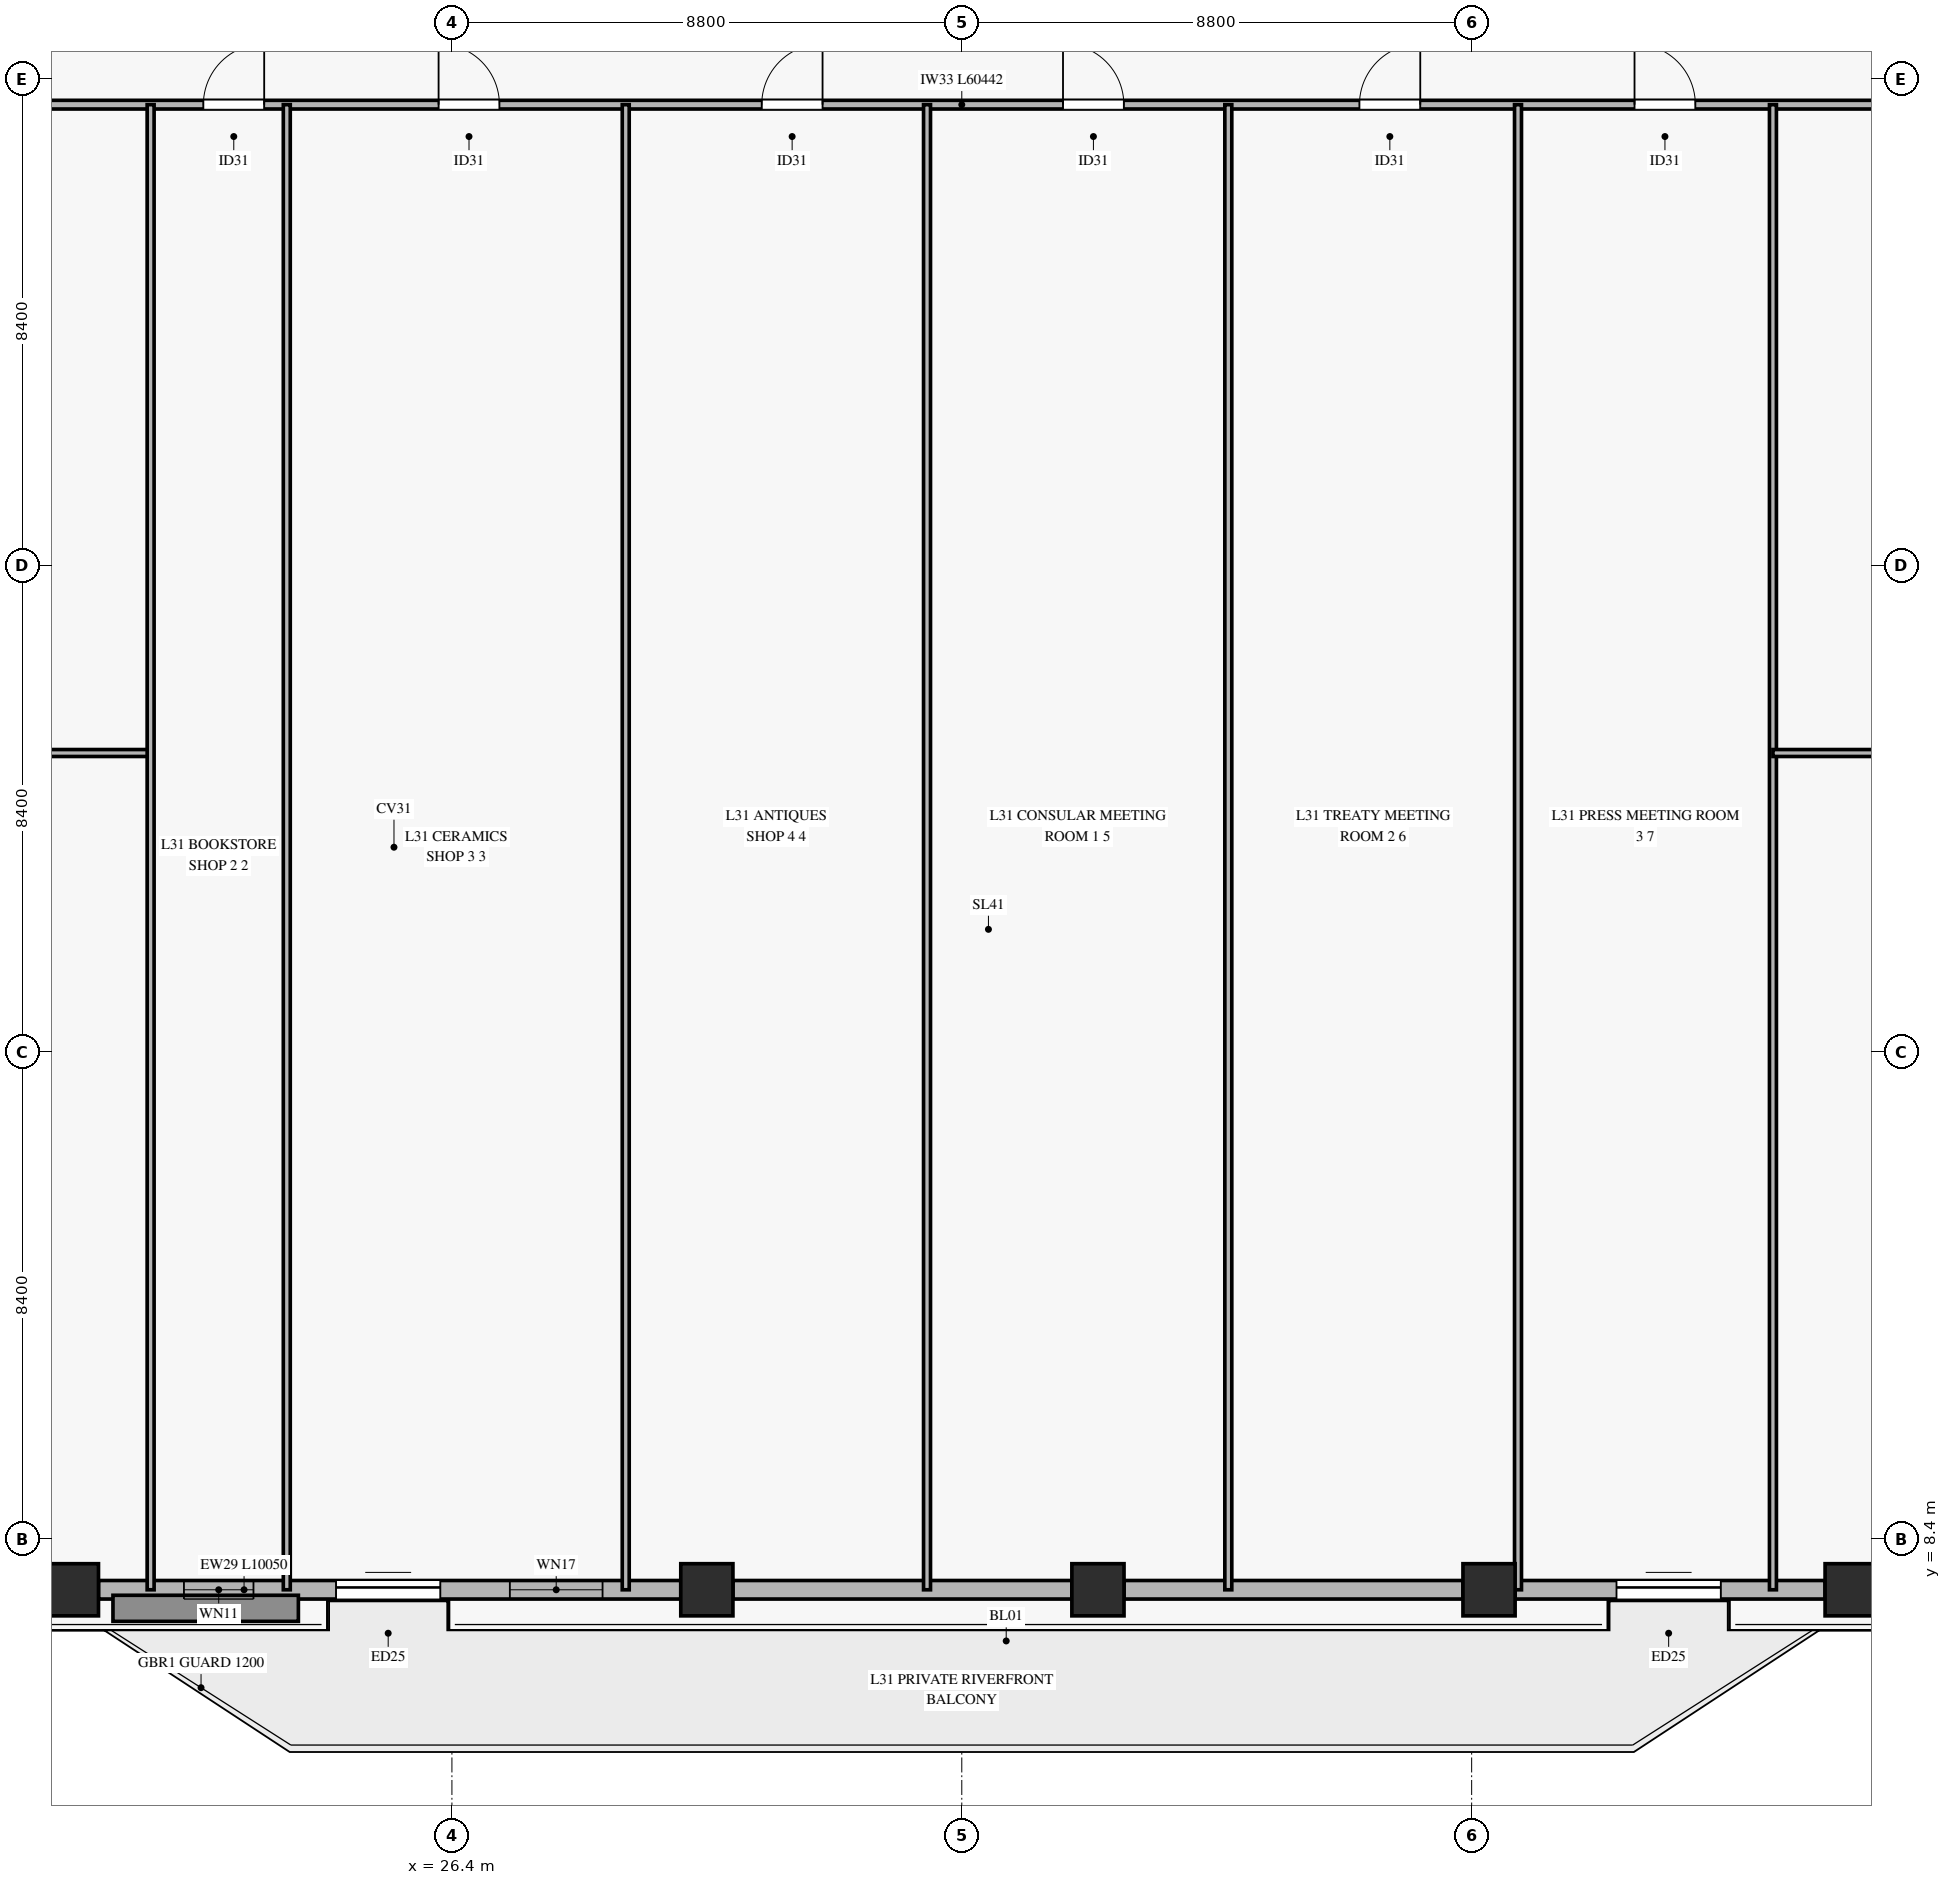
"""IFC4 building model, lengths in metres.
Left out: names, types, materials, properties, quantities, classifications, styles, units other than length and angle.
Written with IfcOpenShell. Run it as: python <this file> out.ifc"""

import sys

from ifc_helpers import new_model, si_unit, direction, frame, frame_2d, origin, origin_2d, place, context, subcontext, project, spatial, rectangle, hollow_rectangle, extrude, source, transform, mapped, element, fill, save


model = new_model("IFC4")
c1 = context("Model", 3, precision=1e-05, world=origin(), true_north=direction((0.0, 1.0)))
c2 = subcontext(c1, "Body", "Model", "MODEL_VIEW")
j1 = project(units=[si_unit("LENGTHUNIT", "METRE"), si_unit("PLANEANGLEUNIT", "RADIAN")], contexts=[c1])
p1 = place(None, origin())
s1 = spatial("IfcSite", under=j1, at=p1, CompositionType="ELEMENT")
p2 = place(p1, origin())
s2 = spatial("IfcBuilding", under=s1, at=p2, CompositionType="ELEMENT")
p3 = place(p2, frame((0.0, 0.0, 127.0)))
s3 = spatial("IfcBuildingStorey", under=s2, at=p3, CompositionType="ELEMENT", Elevation=127.0)
m1 = source(origin(), c2, "Body", "SweptSolid", [
    extrude(hollow_rectangle(XDim=0.9, YDim=0.9, WallThickness=0.04, at=origin_2d()), origin(), (0.0, 0.0, 1.0), 3.64),
])
for number, where, z_axis, x_axis in (
    (1, (19.85, 7.518, 0.0), (0.0, 0.0, 1.0), (1.0, 0.0, 0.0)),
    (2, (30.8, 7.518, 0.0), (0.0, 0.0, 1.0), (1.0, 0.0, 0.0)),
    (3, (37.55, 7.518, 0.0), (0.0, 0.0, 1.0), (1.0, 0.0, 0.0)),
    (4, (44.3, 7.518, 0.0), (0.0, 0.0, 1.0), (1.0, 0.0, 0.0)),
    (5, (50.55, 7.518, 0.0), (0.0, 0.0, 1.0), (1.0, 0.0, 0.0)),
):
    element("IfcColumn", number, at=place(p3, frame(where, z_axis=z_axis, x_axis=x_axis)), inside=s3, PredefinedType="COLUMN", context=c2, shape_type="MappedRepresentation", body=[
        mapped(m1, transform((0.0, 0.0, 0.0), x_axis=(1.0, 0.0, 0.0), y_axis=(0.0, 1.0, 0.0), z_axis=(0.0, 0.0, 1.0), scale=1.0)),
    ])
p4 = place(p3, frame((20.3, 7.518, 0.0), z_axis=(0.0, 0.0, 1.0), x_axis=(1.0, 0.0, 0.0)))
e6 = element("IfcWall", 6, at=p4, inside=s3, PredefinedType="SOLIDWALL", context=c2, shape_type="SweptSolid", body=[
    extrude(rectangle(XDim=10.05, YDim=0.32, at=frame_2d((5.025, 0.0))), origin(), (0.0, 0.0, 1.0), 3.12),
])
p5 = place(p4, frame((4.1, 0.0, 0.0)))
e7 = element("IfcOpeningElement", 7, at=p5, cuts=e6, PredefinedType="OPENING", context=c2, shape_type="SweptSolid", body=[
    extrude(rectangle(XDim=1.8, YDim=2.25, at=frame_2d((0.9, 1.125))), frame((0.0, 0.17, 0.0), z_axis=(0.0, -1.0, 0.0), x_axis=(1.0, 0.0, 0.0)), (0.0, 0.0, 1.0), 0.34),
])
p6 = place(p4, frame((1.475, 0.0, 0.45)))
e8 = element("IfcOpeningElement", 8, at=p6, cuts=e6, PredefinedType="OPENING", context=c2, shape_type="SweptSolid", body=[
    extrude(rectangle(XDim=1.2, YDim=2.0, at=frame_2d((0.6, 1.0))), frame((0.0, 0.17, 0.0), z_axis=(0.0, -1.0, 0.0), x_axis=(1.0, 0.0, 0.0)), (0.0, 0.0, 1.0), 0.34),
])
p7 = place(p4, frame((7.1, 0.0, 0.45)))
e9 = element("IfcOpeningElement", 9, at=p7, cuts=e6, PredefinedType="OPENING", context=c2, shape_type="SweptSolid", body=[
    extrude(rectangle(XDim=1.6, YDim=2.0, at=frame_2d((0.8, 1.0))), frame((0.0, 0.17, 0.0), z_axis=(0.0, -1.0, 0.0), x_axis=(1.0, 0.0, 0.0)), (0.0, 0.0, 1.0), 0.34),
])
for number, where, z_axis, x_axis in (
    (10, (31.25, 7.518, 0.0), (0.0, 0.0, 1.0), (1.0, 0.0, 0.0)),
    (11, (38.0, 7.518, 0.0), (0.0, 0.0, 1.0), (1.0, 0.0, 0.0)),
):
    element("IfcWall", number, at=place(p3, frame(where, z_axis=z_axis, x_axis=x_axis)), inside=s3, PredefinedType="SOLIDWALL", context=c2, shape_type="SweptSolid", body=[
        extrude(rectangle(XDim=5.85, YDim=0.32, at=frame_2d((2.925, 0.0))), origin(), (0.0, 0.0, 1.0), 3.12),
    ])
p8 = place(p3, frame((44.75, 7.518, 0.0), z_axis=(0.0, 0.0, 1.0), x_axis=(1.0, 0.0, 0.0)))
e12 = element("IfcWall", 12, at=p8, inside=s3, PredefinedType="SOLIDWALL", context=c2, shape_type="SweptSolid", body=[
    extrude(rectangle(XDim=5.35, YDim=0.32, at=frame_2d((2.675, 0.0))), origin(), (0.0, 0.0, 1.0), 3.12),
])
p9 = place(p8, frame((1.75, 0.0, 0.0)))
e13 = element("IfcOpeningElement", 13, at=p9, cuts=e12, PredefinedType="OPENING", context=c2, shape_type="SweptSolid", body=[
    extrude(rectangle(XDim=1.8, YDim=2.25, at=frame_2d((0.9, 1.125))), frame((0.0, 0.17, 0.0), z_axis=(0.0, -1.0, 0.0), x_axis=(1.0, 0.0, 0.0)), (0.0, 0.0, 1.0), 0.34),
])
p10 = place(p3, frame((4.979, 33.15, 0.0), z_axis=(0.0, 0.0, 1.0), x_axis=(1.0, 0.0, 0.0)))
e14 = element("IfcWall", 14, at=p10, inside=s3, PredefinedType="PARTITIONING", context=c2, shape_type="SweptSolid", body=[
    extrude(rectangle(XDim=60.442, YDim=0.15, at=frame_2d((30.221, 0.0))), origin(), (0.0, 0.0, 1.0), 2.725),
])
p11 = place(p10, frame((6.774, 0.0, 0.0)))
e15 = element("IfcOpeningElement", 15, at=p11, cuts=e14, PredefinedType="OPENING", context=c2, shape_type="SweptSolid", body=[
    extrude(rectangle(XDim=1.05, YDim=2.15, at=frame_2d((0.525, 1.075))), frame((0.0, 0.085, 0.0), z_axis=(0.0, -1.0, 0.0), x_axis=(1.0, 0.0, 0.0)), (0.0, 0.0, 1.0), 0.17),
])
p12 = place(p10, frame((17.131, 0.0, 0.0)))
e16 = element("IfcOpeningElement", 16, at=p12, cuts=e14, PredefinedType="OPENING", context=c2, shape_type="SweptSolid", body=[
    extrude(rectangle(XDim=1.05, YDim=2.15, at=frame_2d((0.525, 1.075))), frame((0.0, 0.085, 0.0), z_axis=(0.0, -1.0, 0.0), x_axis=(1.0, 0.0, 0.0)), (0.0, 0.0, 1.0), 0.17),
])
p13 = place(p10, frame((21.191, 0.0, 0.0)))
e17 = element("IfcOpeningElement", 17, at=p13, cuts=e14, PredefinedType="OPENING", context=c2, shape_type="SweptSolid", body=[
    extrude(rectangle(XDim=1.05, YDim=2.15, at=frame_2d((0.525, 1.075))), frame((0.0, 0.085, 0.0), z_axis=(0.0, -1.0, 0.0), x_axis=(1.0, 0.0, 0.0)), (0.0, 0.0, 1.0), 0.17),
])
p14 = place(p10, frame((26.768, 0.0, 0.0)))
e18 = element("IfcOpeningElement", 18, at=p14, cuts=e14, PredefinedType="OPENING", context=c2, shape_type="SweptSolid", body=[
    extrude(rectangle(XDim=1.05, YDim=2.15, at=frame_2d((0.525, 1.075))), frame((0.0, 0.085, 0.0), z_axis=(0.0, -1.0, 0.0), x_axis=(1.0, 0.0, 0.0)), (0.0, 0.0, 1.0), 0.17),
])
p15 = place(p10, frame((31.968, 0.0, 0.0)))
e19 = element("IfcOpeningElement", 19, at=p15, cuts=e14, PredefinedType="OPENING", context=c2, shape_type="SweptSolid", body=[
    extrude(rectangle(XDim=1.05, YDim=2.15, at=frame_2d((0.525, 1.075))), frame((0.0, 0.085, 0.0), z_axis=(0.0, -1.0, 0.0), x_axis=(1.0, 0.0, 0.0)), (0.0, 0.0, 1.0), 0.17),
])
p16 = place(p10, frame((37.084, 0.0, 0.0)))
e20 = element("IfcOpeningElement", 20, at=p16, cuts=e14, PredefinedType="OPENING", context=c2, shape_type="SweptSolid", body=[
    extrude(rectangle(XDim=1.05, YDim=2.15, at=frame_2d((0.525, 1.075))), frame((0.0, 0.085, 0.0), z_axis=(0.0, -1.0, 0.0), x_axis=(1.0, 0.0, 0.0)), (0.0, 0.0, 1.0), 0.17),
])
p17 = place(p10, frame((41.832, 0.0, 0.0)))
e21 = element("IfcOpeningElement", 21, at=p17, cuts=e14, PredefinedType="OPENING", context=c2, shape_type="SweptSolid", body=[
    extrude(rectangle(XDim=1.05, YDim=2.15, at=frame_2d((0.525, 1.075))), frame((0.0, 0.085, 0.0), z_axis=(0.0, -1.0, 0.0), x_axis=(1.0, 0.0, 0.0)), (0.0, 0.0, 1.0), 0.17),
])
p18 = place(p10, frame((50.795, 0.0, 0.0)))
e22 = element("IfcOpeningElement", 22, at=p18, cuts=e14, PredefinedType="OPENING", context=c2, shape_type="SweptSolid", body=[
    extrude(rectangle(XDim=1.05, YDim=2.15, at=frame_2d((0.525, 1.075))), frame((0.0, 0.085, 0.0), z_axis=(0.0, -1.0, 0.0), x_axis=(1.0, 0.0, 0.0)), (0.0, 0.0, 1.0), 0.17),
])
p19 = place(p3, frame((4.979, 21.96, 0.0), z_axis=(0.0, 0.0, 1.0), x_axis=(1.0, 0.0, 0.0)))
e23 = element("IfcWall", 23, at=p19, inside=s3, PredefinedType="PARTITIONING", context=c2, shape_type="SweptSolid", body=[
    extrude(rectangle(XDim=16.221, YDim=0.12, at=frame_2d((8.11, 0.0))), origin(), (0.0, 0.0, 1.0), 2.725),
])
p20 = place(p19, frame((7.092, 0.0, 0.0)))
e24 = element("IfcOpeningElement", 24, at=p20, cuts=e23, PredefinedType="OPENING", context=c2, shape_type="SweptSolid", body=[
    extrude(rectangle(XDim=0.95, YDim=2.1, at=frame_2d((0.475, 1.05))), frame((0.0, 0.07, 0.0), z_axis=(0.0, -1.0, 0.0), x_axis=(1.0, 0.0, 0.0)), (0.0, 0.0, 1.0), 0.14),
])
for number, where, z_axis, x_axis in (
    (25, (21.2, 7.518, 0.0), (0.0, 0.0, 1.0), (0.0, 1.0, 0.0)),
    (26, (23.55, 7.518, 0.0), (0.0, 0.0, 1.0), (0.0, 1.0, 0.0)),
    (27, (29.4, 7.518, 0.0), (0.0, 0.0, 1.0), (0.0, 1.0, 0.0)),
    (28, (34.6, 7.518, 0.0), (0.0, 0.0, 1.0), (0.0, 1.0, 0.0)),
    (29, (39.8, 7.518, 0.0), (0.0, 0.0, 1.0), (0.0, 1.0, 0.0)),
    (30, (44.8, 7.518, 0.0), (0.0, 0.0, 1.0), (0.0, 1.0, 0.0)),
    (31, (49.2, 7.518, 0.0), (0.0, 0.0, 1.0), (0.0, 1.0, 0.0)),
):
    element("IfcWall", number, at=place(p3, frame(where, z_axis=z_axis, x_axis=x_axis)), inside=s3, PredefinedType="PARTITIONING", context=c2, shape_type="SweptSolid", body=[
        extrude(rectangle(XDim=25.632, YDim=0.12, at=frame_2d((12.816, 0.0))), origin(), (0.0, 0.0, 1.0), 3.125),
    ])
p21 = place(p3, frame((49.2, 21.96, 0.0), z_axis=(0.0, 0.0, 1.0), x_axis=(1.0, 0.0, 0.0)))
e32 = element("IfcWall", 32, at=p21, inside=s3, PredefinedType="PARTITIONING", context=c2, shape_type="SweptSolid", body=[
    extrude(rectangle(XDim=16.221, YDim=0.12, at=frame_2d((8.11, 0.0))), origin(), (0.0, 0.0, 1.0), 2.725),
])
p22 = place(p21, frame((6.892, 0.0, 0.0)))
e33 = element("IfcOpeningElement", 33, at=p22, cuts=e32, PredefinedType="OPENING", context=c2, shape_type="SweptSolid", body=[
    extrude(rectangle(XDim=0.95, YDim=2.1, at=frame_2d((0.475, 1.05))), frame((0.0, 0.07, 0.0), z_axis=(0.0, -1.0, 0.0), x_axis=(1.0, 0.0, 0.0)), (0.0, 0.0, 1.0), 0.14),
])
m2 = source(origin(), c2, "Body", "SweptSolid", [
    extrude(rectangle(XDim=1.8, YDim=2.25, at=frame_2d((0.9, 1.125))), frame((0.0, 0.025, 0.0), z_axis=(0.0, -1.0, 0.0), x_axis=(1.0, 0.0, 0.0)), (0.0, 0.0, 1.0), 0.05),
])
p23 = place(p5, origin())
e34 = element("IfcDoor", 34, at=p23, inside=s3, OperationType="SLIDING_TO_LEFT", PredefinedType="DOOR", context=c2, shape_type="MappedRepresentation", body=[
    mapped(m2, transform((0.0, 0.0, 0.0), x_axis=(1.0, 0.0, 0.0), y_axis=(0.0, 1.0, 0.0), z_axis=(0.0, 0.0, 1.0), scale=1.0)),
])
fill(e7, e34)
m3 = source(origin(), c2, "Body", "SweptSolid", [
    extrude(rectangle(XDim=1.2, YDim=2.0, at=frame_2d((0.6, 1.0))), frame((0.0, 0.03, 0.0), z_axis=(0.0, -1.0, 0.0), x_axis=(1.0, 0.0, 0.0)), (0.0, 0.0, 1.0), 0.06),
])
p24 = place(p6, origin())
e35 = element("IfcWindow", 35, at=p24, inside=s3, PartitioningType="SINGLE_PANEL", PredefinedType="WINDOW", context=c2, shape_type="MappedRepresentation", body=[
    mapped(m3, transform((0.0, 0.0, 0.0), x_axis=(1.0, 0.0, 0.0), y_axis=(0.0, 1.0, 0.0), z_axis=(0.0, 0.0, 1.0), scale=1.0)),
])
fill(e8, e35)
m4 = source(origin(), c2, "Body", "SweptSolid", [
    extrude(rectangle(XDim=1.6, YDim=2.0, at=frame_2d((0.8, 1.0))), frame((0.0, 0.03, 0.0), z_axis=(0.0, -1.0, 0.0), x_axis=(1.0, 0.0, 0.0)), (0.0, 0.0, 1.0), 0.06),
])
p25 = place(p7, origin())
e36 = element("IfcWindow", 36, at=p25, inside=s3, PartitioningType="SINGLE_PANEL", PredefinedType="WINDOW", context=c2, shape_type="MappedRepresentation", body=[
    mapped(m4, transform((0.0, 0.0, 0.0), x_axis=(1.0, 0.0, 0.0), y_axis=(0.0, 1.0, 0.0), z_axis=(0.0, 0.0, 1.0), scale=1.0)),
])
fill(e9, e36)
p26 = place(p9, origin())
e37 = element("IfcDoor", 37, at=p26, inside=s3, OperationType="SLIDING_TO_LEFT", PredefinedType="DOOR", context=c2, shape_type="MappedRepresentation", body=[
    mapped(m2, transform((0.0, 0.0, 0.0), x_axis=(1.0, 0.0, 0.0), y_axis=(0.0, 1.0, 0.0), z_axis=(0.0, 0.0, 1.0), scale=1.0)),
])
fill(e13, e37)
m5 = source(origin(), c2, "Body", "SweptSolid", [
    extrude(rectangle(XDim=1.05, YDim=2.15, at=frame_2d((0.525, 1.075))), frame((0.0, 0.025, 0.0), z_axis=(0.0, -1.0, 0.0), x_axis=(1.0, 0.0, 0.0)), (0.0, 0.0, 1.0), 0.05),
])
p27 = place(p12, origin())
e38 = element("IfcDoor", 38, at=p27, inside=s3, OperationType="SINGLE_SWING_RIGHT", PredefinedType="DOOR", context=c2, shape_type="MappedRepresentation", body=[
    mapped(m5, transform((0.0, 0.0, 0.0), x_axis=(1.0, 0.0, 0.0), y_axis=(0.0, 1.0, 0.0), z_axis=(0.0, 0.0, 1.0), scale=1.0)),
])
fill(e16, e38)
p28 = place(p13, origin())
e39 = element("IfcDoor", 39, at=p28, inside=s3, OperationType="SINGLE_SWING_LEFT", PredefinedType="DOOR", context=c2, shape_type="MappedRepresentation", body=[
    mapped(m5, transform((0.0, 0.0, 0.0), x_axis=(1.0, 0.0, 0.0), y_axis=(0.0, 1.0, 0.0), z_axis=(0.0, 0.0, 1.0), scale=1.0)),
])
fill(e17, e39)
p29 = place(p14, origin())
e40 = element("IfcDoor", 40, at=p29, inside=s3, OperationType="SINGLE_SWING_RIGHT", PredefinedType="DOOR", context=c2, shape_type="MappedRepresentation", body=[
    mapped(m5, transform((0.0, 0.0, 0.0), x_axis=(1.0, 0.0, 0.0), y_axis=(0.0, 1.0, 0.0), z_axis=(0.0, 0.0, 1.0), scale=1.0)),
])
fill(e18, e40)
p30 = place(p15, origin())
e41 = element("IfcDoor", 41, at=p30, inside=s3, OperationType="SINGLE_SWING_LEFT", PredefinedType="DOOR", context=c2, shape_type="MappedRepresentation", body=[
    mapped(m5, transform((0.0, 0.0, 0.0), x_axis=(1.0, 0.0, 0.0), y_axis=(0.0, 1.0, 0.0), z_axis=(0.0, 0.0, 1.0), scale=1.0)),
])
fill(e19, e41)
p31 = place(p16, origin())
e42 = element("IfcDoor", 42, at=p31, inside=s3, OperationType="SINGLE_SWING_RIGHT", PredefinedType="DOOR", context=c2, shape_type="MappedRepresentation", body=[
    mapped(m5, transform((0.0, 0.0, 0.0), x_axis=(1.0, 0.0, 0.0), y_axis=(0.0, 1.0, 0.0), z_axis=(0.0, 0.0, 1.0), scale=1.0)),
])
fill(e20, e42)
p32 = place(p17, origin())
e43 = element("IfcDoor", 43, at=p32, inside=s3, OperationType="SINGLE_SWING_LEFT", PredefinedType="DOOR", context=c2, shape_type="MappedRepresentation", body=[
    mapped(m5, transform((0.0, 0.0, 0.0), x_axis=(1.0, 0.0, 0.0), y_axis=(0.0, 1.0, 0.0), z_axis=(0.0, 0.0, 1.0), scale=1.0)),
])
fill(e21, e43)
save(model, sys.argv[1])
